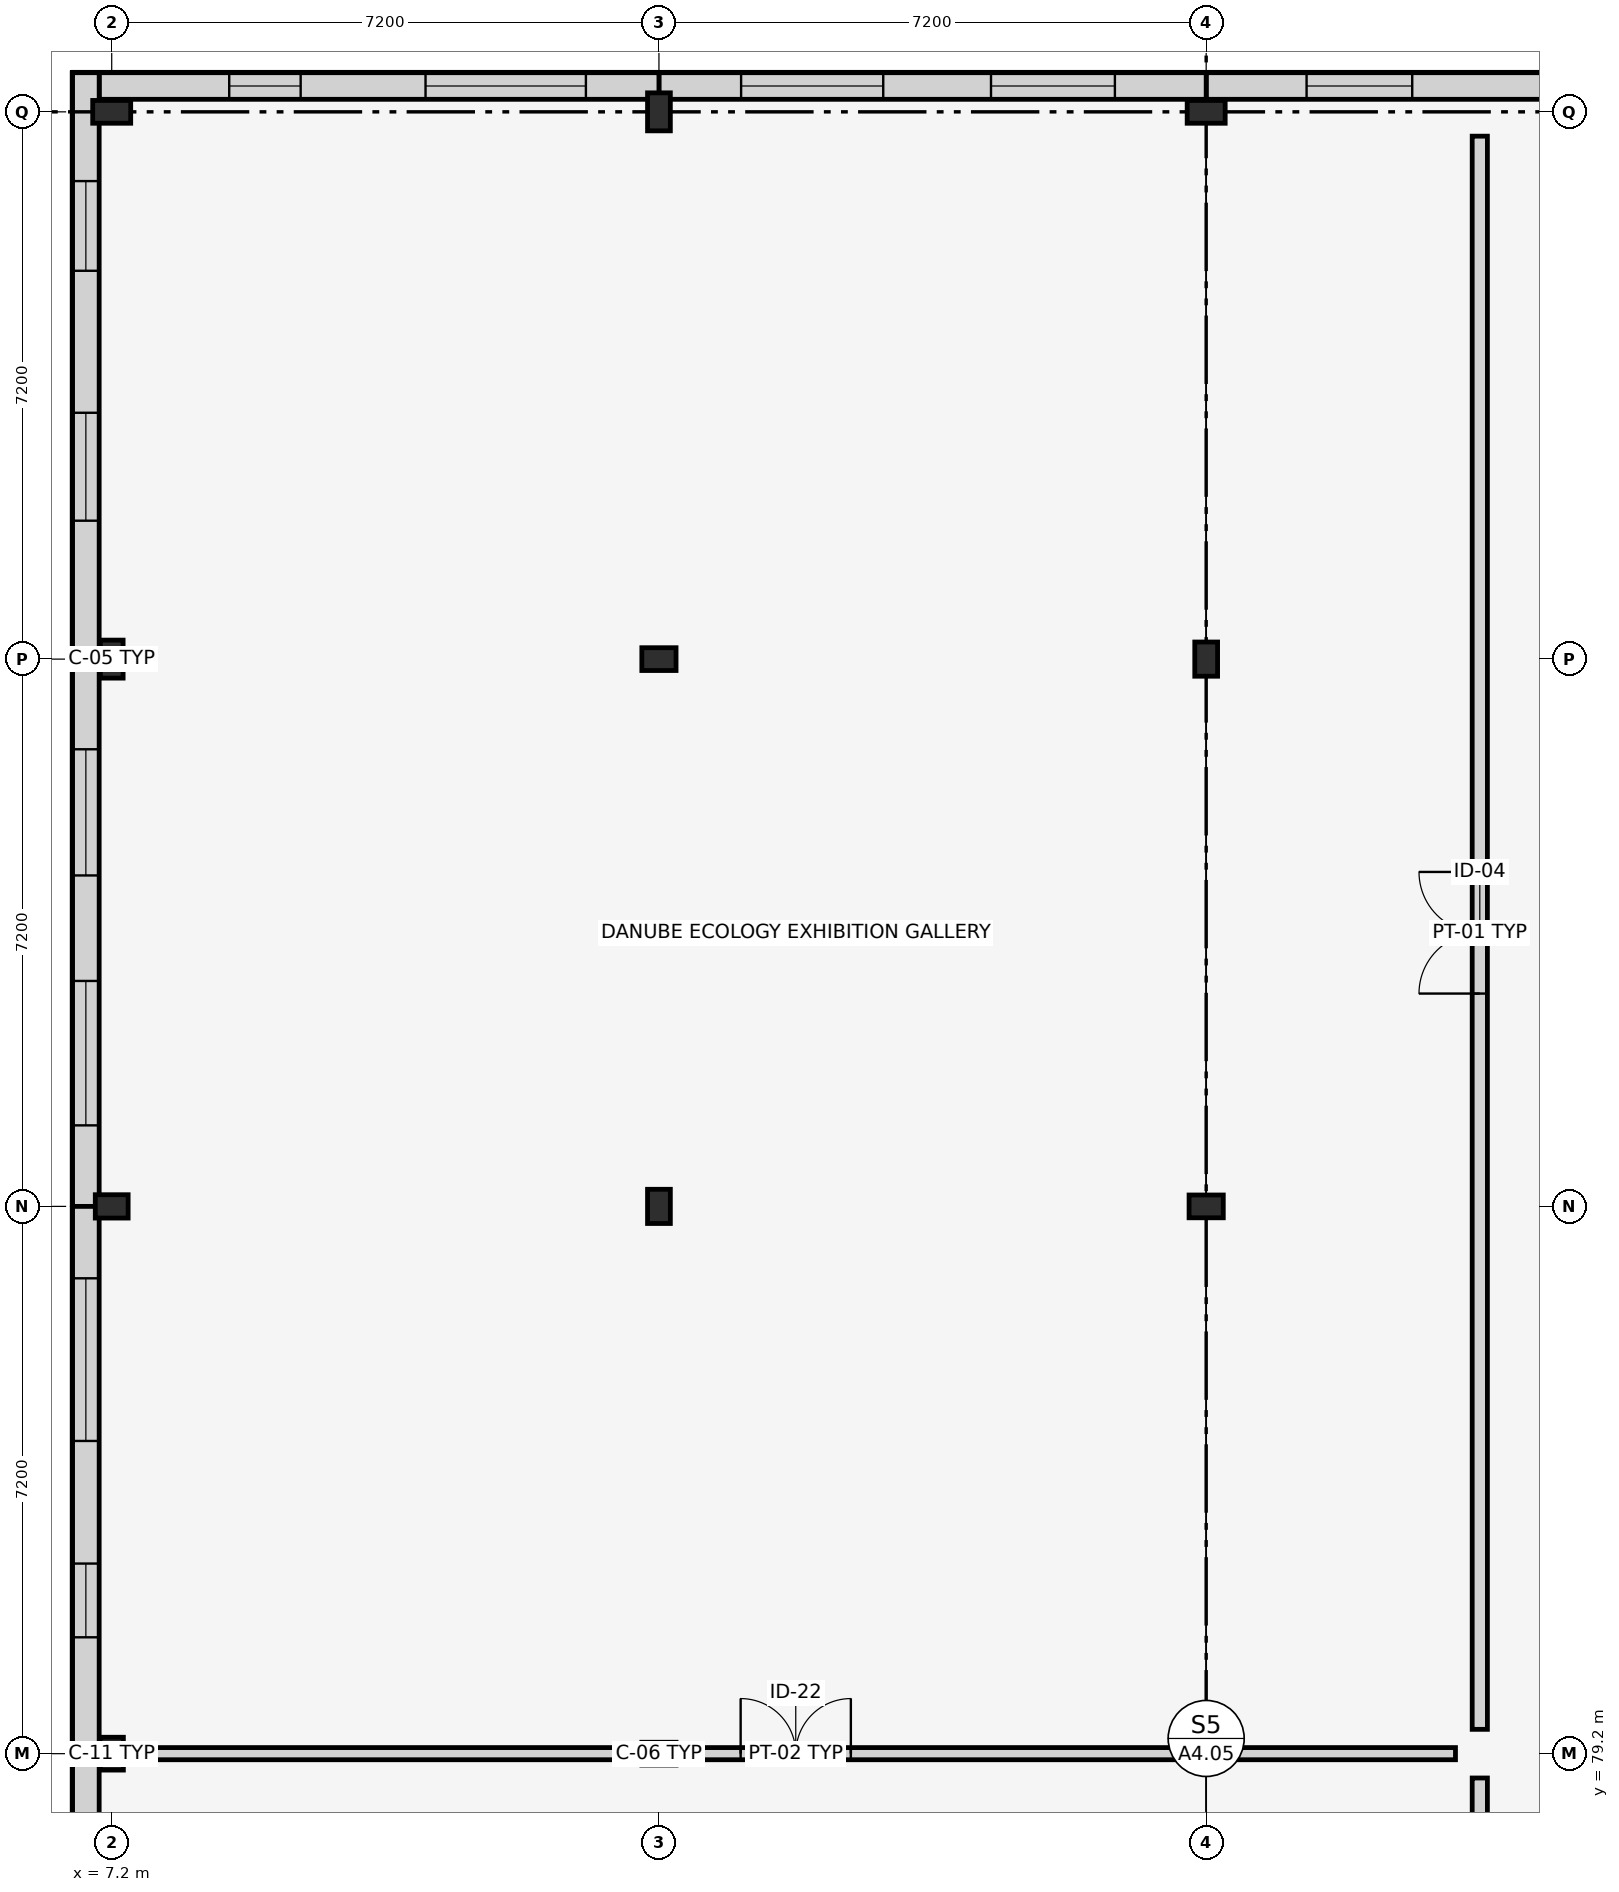
"""IFC4 building model, lengths in metres.
Left out: names, types, materials, properties, quantities, classifications, styles, units other than length and angle.
Written with IfcOpenShell. Run it as: python <this file> out.ifc"""

import sys

from ifc_helpers import new_model, si_unit, direction, frame, frame_2d, origin, origin_2d, place, context, subcontext, project, spatial, rectangle, i_section, extrude, element, fill, save


model = new_model("IFC4")
c1 = context("Model", 3, precision=1e-05, world=origin(), true_north=direction((0.0, 1.0)))
c2 = subcontext(c1, "Body", "Model", "MODEL_VIEW")
j1 = project(units=[si_unit("LENGTHUNIT", "METRE"), si_unit("PLANEANGLEUNIT", "RADIAN")], contexts=[c1])
p1 = place(None, origin())
s1 = spatial("IfcSite", under=j1, at=p1, CompositionType="ELEMENT")
p2 = place(p1, origin())
s2 = spatial("IfcBuilding", under=s1, at=p2, CompositionType="ELEMENT")
p3 = place(p2, origin())
s3 = spatial("IfcBuildingStorey", under=s2, at=p3, CompositionType="ELEMENT", Elevation=0.0)
for number, where, z_axis, x_axis in (
    (1, (7.2, 79.2, 0.0), (0.0, 0.0, 1.0), (1.0, 0.0, 0.0)),
    (2, (7.2, 86.4, 0.0), (0.0, 0.0, 1.0), (0.0, 1.0, 0.0)),
):
    element("IfcColumn", number, at=place(p3, frame(where, z_axis=z_axis, x_axis=x_axis)), inside=s3, PredefinedType="COLUMN", context=c2, shape_type="SweptSolid", body=[
        extrude(i_section(OverallWidth=0.307, OverallDepth=0.432, WebThickness=0.021, FlangeThickness=0.04, FilletRadius=0.027, at=origin_2d()), origin(), (0.0, 0.0, 1.0), 4.5),
    ])
for number, where, z_axis, x_axis in (
    (3, (7.2, 93.6, 0.0), (0.0, 0.0, 1.0), (1.0, 0.0, 0.0)),
    (4, (7.2, 100.8, 0.0), (0.0, 0.0, 1.0), (0.0, 1.0, 0.0)),
):
    element("IfcColumn", number, at=place(p3, frame(where, z_axis=z_axis, x_axis=x_axis)), inside=s3, PredefinedType="COLUMN", context=c2, shape_type="SweptSolid", body=[
        extrude(i_section(OverallWidth=0.3, OverallDepth=0.5, WebThickness=0.014, FlangeThickness=0.028, FilletRadius=0.027, at=origin_2d()), origin(), (0.0, 0.0, 1.0), 4.5),
    ])
for number, where, z_axis, x_axis in (
    (5, (14.4, 79.2, 0.0), (0.0, 0.0, 1.0), (0.0, 1.0, 0.0)),
    (6, (14.4, 86.4, 0.0), (0.0, 0.0, 1.0), (1.0, 0.0, 0.0)),
    (7, (14.4, 93.6, 0.0), (0.0, 0.0, 1.0), (0.0, 1.0, 0.0)),
):
    element("IfcColumn", number, at=place(p3, frame(where, z_axis=z_axis, x_axis=x_axis)), inside=s3, PredefinedType="COLUMN", context=c2, shape_type="SweptSolid", body=[
        extrude(i_section(OverallWidth=0.3, OverallDepth=0.45, WebThickness=0.014, FlangeThickness=0.026, FilletRadius=0.027, at=origin_2d()), origin(), (0.0, 0.0, 1.0), 4.5),
    ])
p4 = place(p3, frame((14.4, 100.8, 0.0), z_axis=(0.0, 0.0, 1.0), x_axis=(1.0, 0.0, 0.0)))
e8 = element("IfcColumn", 8, at=p4, inside=s3, PredefinedType="COLUMN", context=c2, shape_type="SweptSolid", body=[
    extrude(i_section(OverallWidth=0.3, OverallDepth=0.5, WebThickness=0.014, FlangeThickness=0.028, FilletRadius=0.027, at=origin_2d()), origin(), (0.0, 0.0, 1.0), 4.5),
])
for number, where, z_axis, x_axis in (
    (9, (21.6, 79.2, 0.0), (0.0, 0.0, 1.0), (1.0, 0.0, 0.0)),
    (10, (21.6, 86.4, 0.0), (0.0, 0.0, 1.0), (0.0, 1.0, 0.0)),
    (11, (21.6, 93.6, 0.0), (0.0, 0.0, 1.0), (1.0, 0.0, 0.0)),
):
    element("IfcColumn", number, at=place(p3, frame(where, z_axis=z_axis, x_axis=x_axis)), inside=s3, PredefinedType="COLUMN", context=c2, shape_type="SweptSolid", body=[
        extrude(i_section(OverallWidth=0.3, OverallDepth=0.45, WebThickness=0.014, FlangeThickness=0.026, FilletRadius=0.027, at=origin_2d()), origin(), (0.0, 0.0, 1.0), 4.5),
    ])
p5 = place(p3, frame((21.6, 100.8, 0.0), z_axis=(0.0, 0.0, 1.0), x_axis=(0.0, 1.0, 0.0)))
e12 = element("IfcColumn", 12, at=p5, inside=s3, PredefinedType="COLUMN", context=c2, shape_type="SweptSolid", body=[
    extrude(i_section(OverallWidth=0.3, OverallDepth=0.5, WebThickness=0.014, FlangeThickness=0.028, FilletRadius=0.027, at=origin_2d()), origin(), (0.0, 0.0, 1.0), 4.5),
])
p6 = place(p3, frame((28.8, 101.14, 0.0), z_axis=(0.0, 0.0, 1.0), x_axis=(-1.0, 0.0, 0.0)))
e13 = element("IfcWall", 13, at=p6, inside=s3, PredefinedType="STANDARD", context=c2, shape_type="SweptSolid", body=[
    extrude(rectangle(XDim=7.2, YDim=0.35, at=frame_2d((3.6, 0.0))), origin(), (0.0, 0.0, 1.0), 4.5),
])
p7 = place(p6, frame((1.441, 0.0, 0.9)))
e14 = element("IfcOpeningElement", 14, at=p7, cuts=e13, PredefinedType="OPENING", context=c2, shape_type="SweptSolid", body=[
    extrude(rectangle(XDim=1.15, YDim=1.68, at=frame_2d((0.575, 0.84))), frame((0.0, 0.185, 0.0), z_axis=(0.0, -1.0, 0.0), x_axis=(1.0, 0.0, 0.0)), (0.0, 0.0, 1.0), 0.37),
])
p8 = place(p6, frame((4.489, 0.0, 0.9)))
e15 = element("IfcOpeningElement", 15, at=p8, cuts=e13, PredefinedType="OPENING", context=c2, shape_type="SweptSolid", body=[
    extrude(rectangle(XDim=1.39, YDim=1.68, at=frame_2d((0.695, 0.84))), frame((0.0, 0.185, 0.0), z_axis=(0.0, -1.0, 0.0), x_axis=(1.0, 0.0, 0.0)), (0.0, 0.0, 1.0), 0.37),
])
p9 = place(p3, frame((21.6, 101.14, 0.0), z_axis=(0.0, 0.0, 1.0), x_axis=(-1.0, 0.0, 0.0)))
e16 = element("IfcWall", 16, at=p9, inside=s3, PredefinedType="STANDARD", context=c2, shape_type="SweptSolid", body=[
    extrude(rectangle(XDim=7.2, YDim=0.35, at=frame_2d((3.6, 0.0))), origin(), (0.0, 0.0, 1.0), 4.5),
])
p10 = place(p9, frame((1.201, 0.0, 0.9)))
e17 = element("IfcOpeningElement", 17, at=p10, cuts=e16, PredefinedType="OPENING", context=c2, shape_type="SweptSolid", body=[
    extrude(rectangle(XDim=1.63, YDim=1.68, at=frame_2d((0.815, 0.84))), frame((0.0, 0.185, 0.0), z_axis=(0.0, -1.0, 0.0), x_axis=(1.0, 0.0, 0.0)), (0.0, 0.0, 1.0), 0.37),
])
p11 = place(p9, frame((4.249, 0.0, 0.9)))
e18 = element("IfcOpeningElement", 18, at=p11, cuts=e16, PredefinedType="OPENING", context=c2, shape_type="SweptSolid", body=[
    extrude(rectangle(XDim=1.87, YDim=1.68, at=frame_2d((0.935, 0.84))), frame((0.0, 0.185, 0.0), z_axis=(0.0, -1.0, 0.0), x_axis=(1.0, 0.0, 0.0)), (0.0, 0.0, 1.0), 0.37),
])
p12 = place(p3, frame((14.4, 101.14, 0.0), z_axis=(0.0, 0.0, 1.0), x_axis=(-1.0, 0.0, 0.0)))
e19 = element("IfcWall", 19, at=p12, inside=s3, PredefinedType="STANDARD", context=c2, shape_type="SweptSolid", body=[
    extrude(rectangle(XDim=7.365, YDim=0.35, at=frame_2d((3.683, 0.0))), origin(), (0.0, 0.0, 1.0), 4.5),
])
p13 = place(p12, frame((0.961, 0.0, 0.9)))
e20 = element("IfcOpeningElement", 20, at=p13, cuts=e19, PredefinedType="OPENING", context=c2, shape_type="SweptSolid", body=[
    extrude(rectangle(XDim=2.11, YDim=1.68, at=frame_2d((1.055, 0.84))), frame((0.0, 0.185, 0.0), z_axis=(0.0, -1.0, 0.0), x_axis=(1.0, 0.0, 0.0)), (0.0, 0.0, 1.0), 0.37),
])
p14 = place(p12, frame((4.714, 0.0, 0.9)))
e21 = element("IfcOpeningElement", 21, at=p14, cuts=e19, PredefinedType="OPENING", context=c2, shape_type="SweptSolid", body=[
    extrude(rectangle(XDim=0.94, YDim=1.82, at=frame_2d((0.47, 0.91))), frame((0.0, 0.185, 0.0), z_axis=(0.0, -1.0, 0.0), x_axis=(1.0, 0.0, 0.0)), (0.0, 0.0, 1.0), 0.37),
])
p15 = place(p3, frame((6.86, 101.315, 0.0), z_axis=(0.0, 0.0, 1.0), x_axis=(0.0, -1.0, 0.0)))
e22 = element("IfcWall", 22, at=p15, inside=s3, PredefinedType="STANDARD", context=c2, shape_type="SweptSolid", body=[
    extrude(rectangle(XDim=7.715, YDim=0.35, at=frame_2d((3.857, 0.0))), origin(), (0.0, 0.0, 1.0), 4.5),
])
p16 = place(p15, frame((1.426, 0.0, 0.9)))
e23 = element("IfcOpeningElement", 23, at=p16, cuts=e22, PredefinedType="OPENING", context=c2, shape_type="SweptSolid", body=[
    extrude(rectangle(XDim=1.18, YDim=1.82, at=frame_2d((0.59, 0.91))), frame((0.0, 0.185, 0.0), z_axis=(0.0, -1.0, 0.0), x_axis=(1.0, 0.0, 0.0)), (0.0, 0.0, 1.0), 0.37),
])
p17 = place(p15, frame((4.474, 0.0, 0.9)))
e24 = element("IfcOpeningElement", 24, at=p17, cuts=e22, PredefinedType="OPENING", context=c2, shape_type="SweptSolid", body=[
    extrude(rectangle(XDim=1.42, YDim=1.82, at=frame_2d((0.71, 0.91))), frame((0.0, 0.185, 0.0), z_axis=(0.0, -1.0, 0.0), x_axis=(1.0, 0.0, 0.0)), (0.0, 0.0, 1.0), 0.37),
])
p18 = place(p3, frame((6.86, 93.6, 0.0), z_axis=(0.0, 0.0, 1.0), x_axis=(0.0, -1.0, 0.0)))
e25 = element("IfcWall", 25, at=p18, inside=s3, PredefinedType="STANDARD", context=c2, shape_type="SweptSolid", body=[
    extrude(rectangle(XDim=7.2, YDim=0.35, at=frame_2d((3.6, 0.0))), origin(), (0.0, 0.0, 1.0), 4.5),
])
p19 = place(p18, frame((1.186, 0.0, 0.9)))
e26 = element("IfcOpeningElement", 26, at=p19, cuts=e25, PredefinedType="OPENING", context=c2, shape_type="SweptSolid", body=[
    extrude(rectangle(XDim=1.66, YDim=1.82, at=frame_2d((0.83, 0.91))), frame((0.0, 0.185, 0.0), z_axis=(0.0, -1.0, 0.0), x_axis=(1.0, 0.0, 0.0)), (0.0, 0.0, 1.0), 0.37),
])
p20 = place(p18, frame((4.234, 0.0, 0.9)))
e27 = element("IfcOpeningElement", 27, at=p20, cuts=e25, PredefinedType="OPENING", context=c2, shape_type="SweptSolid", body=[
    extrude(rectangle(XDim=1.9, YDim=1.82, at=frame_2d((0.95, 0.91))), frame((0.0, 0.185, 0.0), z_axis=(0.0, -1.0, 0.0), x_axis=(1.0, 0.0, 0.0)), (0.0, 0.0, 1.0), 0.37),
])
p21 = place(p3, frame((6.86, 86.4, 0.0), z_axis=(0.0, 0.0, 1.0), x_axis=(0.0, -1.0, 0.0)))
e28 = element("IfcWall", 28, at=p21, inside=s3, PredefinedType="STANDARD", context=c2, shape_type="SweptSolid", body=[
    extrude(rectangle(XDim=7.2, YDim=0.35, at=frame_2d((3.6, 0.0))), origin(), (0.0, 0.0, 1.0), 4.5),
])
p22 = place(p21, frame((0.946, 0.0, 0.9)))
e29 = element("IfcOpeningElement", 29, at=p22, cuts=e28, PredefinedType="OPENING", context=c2, shape_type="SweptSolid", body=[
    extrude(rectangle(XDim=2.14, YDim=1.82, at=frame_2d((1.07, 0.91))), frame((0.0, 0.185, 0.0), z_axis=(0.0, -1.0, 0.0), x_axis=(1.0, 0.0, 0.0)), (0.0, 0.0, 1.0), 0.37),
])
p23 = place(p21, frame((4.699, 0.0, 0.9)))
e30 = element("IfcOpeningElement", 30, at=p23, cuts=e28, PredefinedType="OPENING", context=c2, shape_type="SweptSolid", body=[
    extrude(rectangle(XDim=0.97, YDim=1.96, at=frame_2d((0.485, 0.98))), frame((0.0, 0.185, 0.0), z_axis=(0.0, -1.0, 0.0), x_axis=(1.0, 0.0, 0.0)), (0.0, 0.0, 1.0), 0.37),
])
p24 = place(p3, frame((6.86, 79.2, 0.0), z_axis=(0.0, 0.0, 1.0), x_axis=(0.0, -1.0, 0.0)))
e31 = element("IfcWall", 31, at=p24, inside=s3, PredefinedType="STANDARD", context=c2, shape_type="SweptSolid", body=[
    extrude(rectangle(XDim=7.2, YDim=0.35, at=frame_2d((3.6, 0.0))), origin(), (0.0, 0.0, 1.0), 4.5),
])
p25 = place(p24, frame((1.411, 0.0, 0.9)))
e32 = element("IfcOpeningElement", 32, at=p25, cuts=e31, PredefinedType="OPENING", context=c2, shape_type="SweptSolid", body=[
    extrude(rectangle(XDim=1.21, YDim=1.96, at=frame_2d((0.605, 0.98))), frame((0.0, 0.185, 0.0), z_axis=(0.0, -1.0, 0.0), x_axis=(1.0, 0.0, 0.0)), (0.0, 0.0, 1.0), 0.37),
])
p26 = place(p24, frame((4.459, 0.0, 0.9)))
e33 = element("IfcOpeningElement", 33, at=p26, cuts=e31, PredefinedType="OPENING", context=c2, shape_type="SweptSolid", body=[
    extrude(rectangle(XDim=1.45, YDim=1.96, at=frame_2d((0.725, 0.98))), frame((0.0, 0.185, 0.0), z_axis=(0.0, -1.0, 0.0), x_axis=(1.0, 0.0, 0.0)), (0.0, 0.0, 1.0), 0.37),
])
p27 = place(p3, frame((25.2, 50.72, 0.0), z_axis=(0.0, 0.0, 1.0), x_axis=(0.0, 1.0, 0.0)))
e34 = element("IfcWall", 34, at=p27, inside=s3, PredefinedType="PARTITIONING", context=c2, shape_type="SweptSolid", body=[
    extrude(rectangle(XDim=28.16, YDim=0.2, at=frame_2d((14.08, 0.0))), origin(), (0.0, 0.0, 1.0), 3.45),
])
p28 = place(p27, frame((1.649, 0.0, 0.0)))
e35 = element("IfcOpeningElement", 35, at=p28, cuts=e34, PredefinedType="OPENING", context=c2, shape_type="SweptSolid", body=[
    extrude(rectangle(XDim=1.6, YDim=2.35, at=frame_2d((0.8, 1.175))), frame((0.0, 0.11, 0.0), z_axis=(0.0, -1.0, 0.0), x_axis=(1.0, 0.0, 0.0)), (0.0, 0.0, 1.0), 0.22),
])
p29 = place(p3, frame((25.2, 79.52, 0.0), z_axis=(0.0, 0.0, 1.0), x_axis=(0.0, 1.0, 0.0)))
e36 = element("IfcWall", 36, at=p29, inside=s3, PredefinedType="PARTITIONING", context=c2, shape_type="SweptSolid", body=[
    extrude(rectangle(XDim=20.96, YDim=0.2, at=frame_2d((10.48, 0.0))), origin(), (0.0, 0.0, 1.0), 3.45),
])
p30 = place(p29, frame((9.68, 0.0, 0.0)))
e37 = element("IfcOpeningElement", 37, at=p30, cuts=e36, PredefinedType="OPENING", context=c2, shape_type="SweptSolid", body=[
    extrude(rectangle(XDim=1.6, YDim=2.35, at=frame_2d((0.8, 1.175))), frame((0.0, 0.11, 0.0), z_axis=(0.0, -1.0, 0.0), x_axis=(1.0, 0.0, 0.0)), (0.0, 0.0, 1.0), 0.22),
])
p31 = place(p3, frame((7.52, 79.2, 0.0), z_axis=(0.0, 0.0, 1.0), x_axis=(1.0, 0.0, 0.0)))
e38 = element("IfcWall", 38, at=p31, inside=s3, PredefinedType="PARTITIONING", context=c2, shape_type="SweptSolid", body=[
    extrude(rectangle(XDim=17.36, YDim=0.16, at=frame_2d((8.68, 0.0))), origin(), (0.0, 0.0, 1.0), 3.45),
])
p32 = place(p31, frame((7.955, 0.0, 0.0)))
e39 = element("IfcOpeningElement", 39, at=p32, cuts=e38, PredefinedType="OPENING", context=c2, shape_type="SweptSolid", body=[
    extrude(rectangle(XDim=1.45, YDim=2.35, at=frame_2d((0.725, 1.175))), frame((0.0, 0.09, 0.0), z_axis=(0.0, -1.0, 0.0), x_axis=(1.0, 0.0, 0.0)), (0.0, 0.0, 1.0), 0.18),
])
p33 = place(p8, origin())
e40 = element("IfcWindow", 40, at=p33, inside=s3, PartitioningType="SINGLE_PANEL", PredefinedType="WINDOW", context=c2, shape_type="SweptSolid", body=[
    extrude(rectangle(XDim=1.39, YDim=1.68, at=frame_2d((0.695, 0.84))), frame((0.0, 0.03, 0.0), z_axis=(0.0, -1.0, 0.0), x_axis=(1.0, 0.0, 0.0)), (0.0, 0.0, 1.0), 0.06),
])
fill(e15, e40)
p34 = place(p10, origin())
e41 = element("IfcWindow", 41, at=p34, inside=s3, PartitioningType="SINGLE_PANEL", PredefinedType="WINDOW", context=c2, shape_type="SweptSolid", body=[
    extrude(rectangle(XDim=1.63, YDim=1.68, at=frame_2d((0.815, 0.84))), frame((0.0, 0.03, 0.0), z_axis=(0.0, -1.0, 0.0), x_axis=(1.0, 0.0, 0.0)), (0.0, 0.0, 1.0), 0.06),
])
fill(e17, e41)
p35 = place(p11, origin())
e42 = element("IfcWindow", 42, at=p35, inside=s3, PartitioningType="SINGLE_PANEL", PredefinedType="WINDOW", context=c2, shape_type="SweptSolid", body=[
    extrude(rectangle(XDim=1.87, YDim=1.68, at=frame_2d((0.935, 0.84))), frame((0.0, 0.03, 0.0), z_axis=(0.0, -1.0, 0.0), x_axis=(1.0, 0.0, 0.0)), (0.0, 0.0, 1.0), 0.06),
])
fill(e18, e42)
p36 = place(p13, origin())
e43 = element("IfcWindow", 43, at=p36, inside=s3, PartitioningType="SINGLE_PANEL", PredefinedType="WINDOW", context=c2, shape_type="SweptSolid", body=[
    extrude(rectangle(XDim=2.11, YDim=1.68, at=frame_2d((1.055, 0.84))), frame((0.0, 0.03, 0.0), z_axis=(0.0, -1.0, 0.0), x_axis=(1.0, 0.0, 0.0)), (0.0, 0.0, 1.0), 0.06),
])
fill(e20, e43)
p37 = place(p14, origin())
e44 = element("IfcWindow", 44, at=p37, inside=s3, PartitioningType="SINGLE_PANEL", PredefinedType="WINDOW", context=c2, shape_type="SweptSolid", body=[
    extrude(rectangle(XDim=0.94, YDim=1.82, at=frame_2d((0.47, 0.91))), frame((0.0, 0.03, 0.0), z_axis=(0.0, -1.0, 0.0), x_axis=(1.0, 0.0, 0.0)), (0.0, 0.0, 1.0), 0.06),
])
fill(e21, e44)
p38 = place(p16, origin())
e45 = element("IfcWindow", 45, at=p38, inside=s3, PartitioningType="SINGLE_PANEL", PredefinedType="WINDOW", context=c2, shape_type="SweptSolid", body=[
    extrude(rectangle(XDim=1.18, YDim=1.82, at=frame_2d((0.59, 0.91))), frame((0.0, 0.03, 0.0), z_axis=(0.0, -1.0, 0.0), x_axis=(1.0, 0.0, 0.0)), (0.0, 0.0, 1.0), 0.06),
])
fill(e23, e45)
p39 = place(p17, origin())
e46 = element("IfcWindow", 46, at=p39, inside=s3, PartitioningType="SINGLE_PANEL", PredefinedType="WINDOW", context=c2, shape_type="SweptSolid", body=[
    extrude(rectangle(XDim=1.42, YDim=1.82, at=frame_2d((0.71, 0.91))), frame((0.0, 0.03, 0.0), z_axis=(0.0, -1.0, 0.0), x_axis=(1.0, 0.0, 0.0)), (0.0, 0.0, 1.0), 0.06),
])
fill(e24, e46)
p40 = place(p19, origin())
e47 = element("IfcWindow", 47, at=p40, inside=s3, PartitioningType="SINGLE_PANEL", PredefinedType="WINDOW", context=c2, shape_type="SweptSolid", body=[
    extrude(rectangle(XDim=1.66, YDim=1.82, at=frame_2d((0.83, 0.91))), frame((0.0, 0.03, 0.0), z_axis=(0.0, -1.0, 0.0), x_axis=(1.0, 0.0, 0.0)), (0.0, 0.0, 1.0), 0.06),
])
fill(e26, e47)
p41 = place(p20, origin())
e48 = element("IfcWindow", 48, at=p41, inside=s3, PartitioningType="SINGLE_PANEL", PredefinedType="WINDOW", context=c2, shape_type="SweptSolid", body=[
    extrude(rectangle(XDim=1.9, YDim=1.82, at=frame_2d((0.95, 0.91))), frame((0.0, 0.03, 0.0), z_axis=(0.0, -1.0, 0.0), x_axis=(1.0, 0.0, 0.0)), (0.0, 0.0, 1.0), 0.06),
])
fill(e27, e48)
p42 = place(p22, origin())
e49 = element("IfcWindow", 49, at=p42, inside=s3, PartitioningType="SINGLE_PANEL", PredefinedType="WINDOW", context=c2, shape_type="SweptSolid", body=[
    extrude(rectangle(XDim=2.14, YDim=1.82, at=frame_2d((1.07, 0.91))), frame((0.0, 0.03, 0.0), z_axis=(0.0, -1.0, 0.0), x_axis=(1.0, 0.0, 0.0)), (0.0, 0.0, 1.0), 0.06),
])
fill(e29, e49)
p43 = place(p23, origin())
e50 = element("IfcWindow", 50, at=p43, inside=s3, PartitioningType="SINGLE_PANEL", PredefinedType="WINDOW", context=c2, shape_type="SweptSolid", body=[
    extrude(rectangle(XDim=0.97, YDim=1.96, at=frame_2d((0.485, 0.98))), frame((0.0, 0.03, 0.0), z_axis=(0.0, -1.0, 0.0), x_axis=(1.0, 0.0, 0.0)), (0.0, 0.0, 1.0), 0.06),
])
fill(e30, e50)
p44 = place(p30, origin())
e51 = element("IfcDoor", 51, at=p44, inside=s3, OperationType="DOUBLE_DOOR_SINGLE_SWING", PredefinedType="DOOR", context=c2, shape_type="SweptSolid", body=[
    extrude(rectangle(XDim=1.6, YDim=2.35, at=frame_2d((0.8, 1.175))), frame((0.0, 0.025, 0.0), z_axis=(0.0, -1.0, 0.0), x_axis=(1.0, 0.0, 0.0)), (0.0, 0.0, 1.0), 0.05),
])
fill(e37, e51)
p45 = place(p32, origin())
e52 = element("IfcDoor", 52, at=p45, inside=s3, OperationType="DOUBLE_DOOR_SINGLE_SWING", PredefinedType="DOOR", context=c2, shape_type="SweptSolid", body=[
    extrude(rectangle(XDim=1.45, YDim=2.35, at=frame_2d((0.725, 1.175))), frame((0.0, 0.025, 0.0), z_axis=(0.0, -1.0, 0.0), x_axis=(1.0, 0.0, 0.0)), (0.0, 0.0, 1.0), 0.05),
])
fill(e39, e52)
save(model, sys.argv[1])
